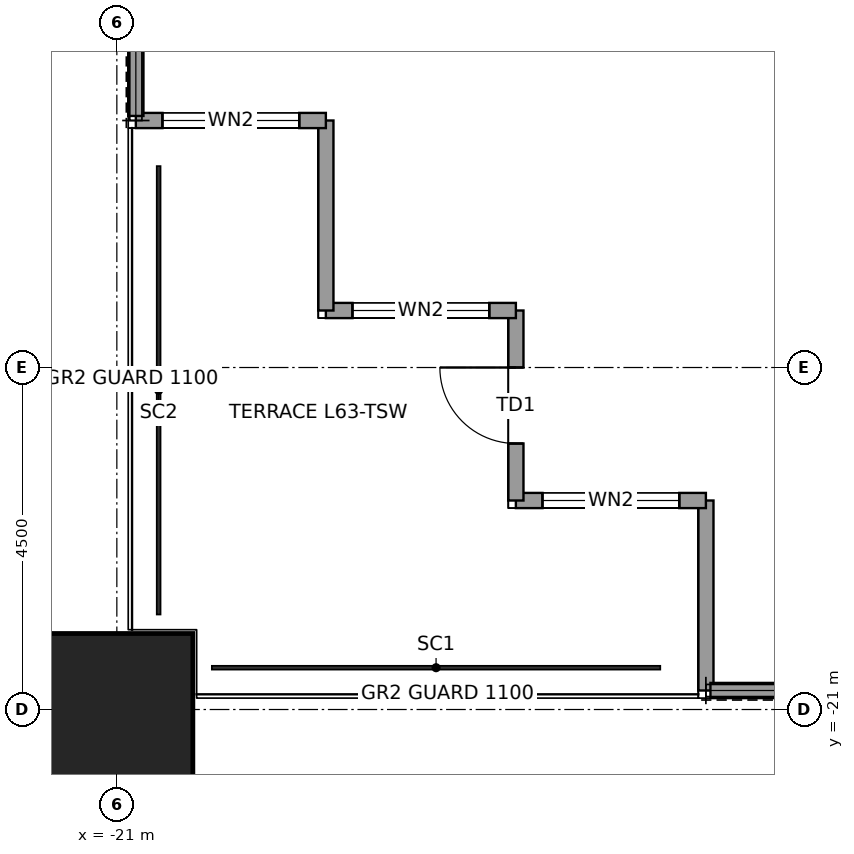
"""IFC4 building model, lengths in metres.
Left out: names, types, materials, properties, quantities, classifications, styles, units other than length and angle.
Written with IfcOpenShell. Run it as: python <this file> out.ifc"""

import sys

from ifc_helpers import new_model, si_unit, direction, frame, frame_2d, origin, origin_2d, place, context, subcontext, project, spatial, rectangle, hollow_rectangle, extrude, element, fill, save


model = new_model("IFC4")
c1 = context("Model", 3, precision=1e-05, world=origin(), true_north=direction((0.0, 1.0)))
c2 = subcontext(c1, "Body", "Model", "MODEL_VIEW")
j1 = project(units=[si_unit("LENGTHUNIT", "METRE"), si_unit("PLANEANGLEUNIT", "RADIAN")], contexts=[c1])
p1 = place(None, origin())
s1 = spatial("IfcSite", under=j1, at=p1, CompositionType="ELEMENT")
p2 = place(p1, origin())
s2 = spatial("IfcBuilding", under=s1, at=p2, CompositionType="ELEMENT")
p3 = place(p2, frame((0.0, 0.0, 287.9)))
s3 = spatial("IfcBuildingStorey", under=s2, at=p3, CompositionType="ELEMENT", Elevation=287.9)
p4 = place(p3, frame((-21.0, -21.0, 0.0), z_axis=(0.0, 0.0, 1.0), x_axis=(1.0, 0.0, 0.0)))
e1 = element("IfcColumn", 1, at=p4, inside=s3, PredefinedType="COLUMN", context=c2, shape_type="SweptSolid", body=[
    extrude(hollow_rectangle(XDim=2.0, YDim=2.0, WallThickness=0.095, at=origin_2d()), origin(), (0.0, 0.0, 1.0), 4.0),
])
p5 = place(p3, frame((-13.25, -20.75, 0.0), z_axis=(0.0, 0.0, 1.0), x_axis=(0.0, 1.0, 0.0)))
e2 = element("IfcWall", 2, at=p5, inside=s3, PredefinedType="SOLIDWALL", context=c2, shape_type="SweptSolid", body=[
    extrude(rectangle(XDim=2.5, YDim=0.2, at=frame_2d((1.25, 0.0))), origin(), (0.0, 0.0, 1.0), 3.85),
])
p6 = place(p3, frame((-13.25, -18.25, 0.0), z_axis=(0.0, 0.0, 1.0), x_axis=(-1.0, 0.0, 0.0)))
e3 = element("IfcWall", 3, at=p6, inside=s3, PredefinedType="SOLIDWALL", context=c2, shape_type="SweptSolid", body=[
    extrude(rectangle(XDim=2.5, YDim=0.2, at=frame_2d((1.25, 0.0))), origin(), (0.0, 0.0, 1.0), 3.85),
])
p7 = place(p6, frame((0.35, 0.0, 0.3)))
e4 = element("IfcOpeningElement", 4, at=p7, cuts=e3, PredefinedType="OPENING", context=c2, shape_type="SweptSolid", body=[
    extrude(rectangle(XDim=1.8, YDim=2.4, at=frame_2d((0.9, 1.2))), frame((0.0, 0.11, 0.0), z_axis=(0.0, -1.0, 0.0), x_axis=(1.0, 0.0, 0.0)), (0.0, 0.0, 1.0), 0.22),
])
p8 = place(p3, frame((-15.75, -18.25, 0.0), z_axis=(0.0, 0.0, 1.0), x_axis=(0.0, 1.0, 0.0)))
e5 = element("IfcWall", 5, at=p8, inside=s3, PredefinedType="SOLIDWALL", context=c2, shape_type="SweptSolid", body=[
    extrude(rectangle(XDim=2.5, YDim=0.2, at=frame_2d((1.25, 0.0))), origin(), (0.0, 0.0, 1.0), 3.317),
])
p9 = place(p8, frame((0.75, 0.0, 0.0)))
e6 = element("IfcOpeningElement", 6, at=p9, cuts=e5, PredefinedType="OPENING", context=c2, shape_type="SweptSolid", body=[
    extrude(rectangle(XDim=1.0, YDim=2.4, at=frame_2d((0.5, 1.2))), frame((0.0, 0.11, 0.0), z_axis=(0.0, -1.0, 0.0), x_axis=(1.0, 0.0, 0.0)), (0.0, 0.0, 1.0), 0.22),
])
p10 = place(p3, frame((-15.75, -15.75, 0.0), z_axis=(0.0, 0.0, 1.0), x_axis=(-1.0, 0.0, 0.0)))
e7 = element("IfcWall", 7, at=p10, inside=s3, PredefinedType="SOLIDWALL", context=c2, shape_type="SweptSolid", body=[
    extrude(rectangle(XDim=2.5, YDim=0.2, at=frame_2d((1.25, 0.0))), origin(), (0.0, 0.0, 1.0), 3.85),
])
p11 = place(p10, frame((0.35, 0.0, 0.3)))
e8 = element("IfcOpeningElement", 8, at=p11, cuts=e7, PredefinedType="OPENING", context=c2, shape_type="SweptSolid", body=[
    extrude(rectangle(XDim=1.8, YDim=2.4, at=frame_2d((0.9, 1.2))), frame((0.0, 0.11, 0.0), z_axis=(0.0, -1.0, 0.0), x_axis=(1.0, 0.0, 0.0)), (0.0, 0.0, 1.0), 0.22),
])
p12 = place(p3, frame((-18.25, -15.75, 0.0), z_axis=(0.0, 0.0, 1.0), x_axis=(0.0, 1.0, 0.0)))
e9 = element("IfcWall", 9, at=p12, inside=s3, PredefinedType="SOLIDWALL", context=c2, shape_type="SweptSolid", body=[
    extrude(rectangle(XDim=2.5, YDim=0.2, at=frame_2d((1.25, 0.0))), origin(), (0.0, 0.0, 1.0), 3.85),
])
p13 = place(p3, frame((-18.25, -13.25, 0.0), z_axis=(0.0, 0.0, 1.0), x_axis=(-1.0, 0.0, 0.0)))
e10 = element("IfcWall", 10, at=p13, inside=s3, PredefinedType="SOLIDWALL", context=c2, shape_type="SweptSolid", body=[
    extrude(rectangle(XDim=2.5, YDim=0.2, at=frame_2d((1.25, 0.0))), origin(), (0.0, 0.0, 1.0), 3.85),
])
p14 = place(p13, frame((0.35, 0.0, 0.3)))
e11 = element("IfcOpeningElement", 11, at=p14, cuts=e10, PredefinedType="OPENING", context=c2, shape_type="SweptSolid", body=[
    extrude(rectangle(XDim=1.8, YDim=2.4, at=frame_2d((0.9, 1.2))), frame((0.0, 0.11, 0.0), z_axis=(0.0, -1.0, 0.0), x_axis=(1.0, 0.0, 0.0)), (0.0, 0.0, 1.0), 0.22),
])
for number, where, z_axis, x_axis in (
    (12, (-10.405, -20.75, 0.0), (0.0, 0.0, 1.0), (-1.0, 0.0, 0.0)),
    (13, (-20.75, -13.19, 0.0), (0.0, 0.0, 1.0), (0.0, 1.0, 0.0)),
):
    element("IfcWall", number, at=place(p3, frame(where, z_axis=z_axis, x_axis=x_axis)), inside=s3, PredefinedType="SOLIDWALL", context=c2, shape_type="SweptSolid", body=[
        extrude(rectangle(XDim=2.785, YDim=0.2, at=frame_2d((1.393, 0.0))), origin(), (0.0, 0.0, 1.0), 3.85),
    ])
p15 = place(p7, origin())
e14 = element("IfcWindow", 14, at=p15, inside=s3, PartitioningType="SINGLE_PANEL", PredefinedType="WINDOW", context=c2, shape_type="SweptSolid", body=[
    extrude(rectangle(XDim=1.8, YDim=2.4, at=frame_2d((0.9, 1.2))), frame((0.0, 0.03, 0.0), z_axis=(0.0, -1.0, 0.0), x_axis=(1.0, 0.0, 0.0)), (0.0, 0.0, 1.0), 0.06),
])
fill(e4, e14)
p16 = place(p9, origin())
e15 = element("IfcDoor", 15, at=p16, inside=s3, OperationType="SINGLE_SWING_RIGHT", PredefinedType="DOOR", context=c2, shape_type="SweptSolid", body=[
    extrude(rectangle(XDim=1.0, YDim=2.4, at=frame_2d((0.5, 1.2))), frame((0.0, 0.025, 0.0), z_axis=(0.0, -1.0, 0.0), x_axis=(1.0, 0.0, 0.0)), (0.0, 0.0, 1.0), 0.05),
])
fill(e6, e15)
p17 = place(p11, origin())
e16 = element("IfcWindow", 16, at=p17, inside=s3, PartitioningType="SINGLE_PANEL", PredefinedType="WINDOW", context=c2, shape_type="SweptSolid", body=[
    extrude(rectangle(XDim=1.8, YDim=2.4, at=frame_2d((0.9, 1.2))), frame((0.0, 0.03, 0.0), z_axis=(0.0, -1.0, 0.0), x_axis=(1.0, 0.0, 0.0)), (0.0, 0.0, 1.0), 0.06),
])
fill(e8, e16)
p18 = place(p14, origin())
e17 = element("IfcWindow", 17, at=p18, inside=s3, PartitioningType="SINGLE_PANEL", PredefinedType="WINDOW", context=c2, shape_type="SweptSolid", body=[
    extrude(rectangle(XDim=1.8, YDim=2.4, at=frame_2d((0.9, 1.2))), frame((0.0, 0.03, 0.0), z_axis=(0.0, -1.0, 0.0), x_axis=(1.0, 0.0, 0.0)), (0.0, 0.0, 1.0), 0.06),
])
fill(e11, e17)
save(model, sys.argv[1])
